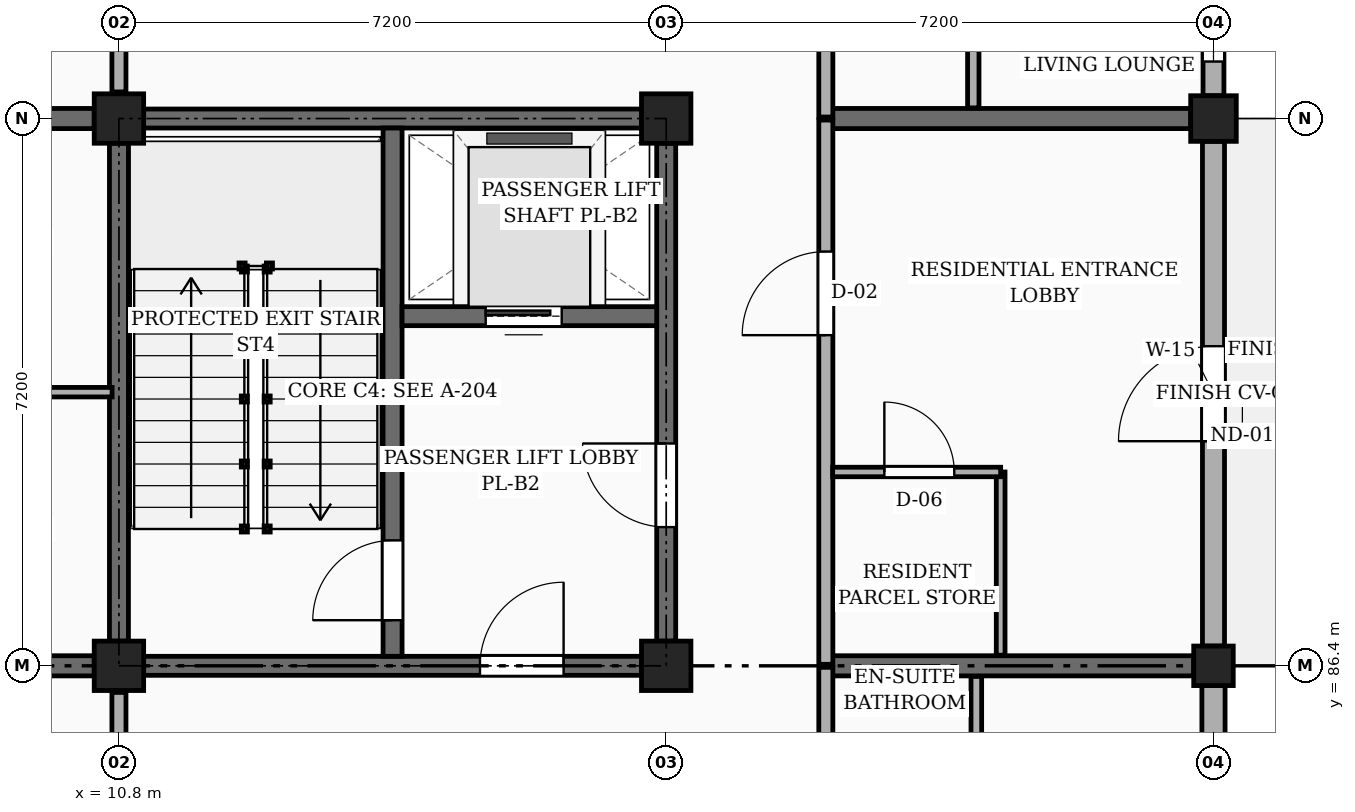
"""IFC4 building model, lengths in metres.
Left out: names, types, materials, properties, quantities, classifications, styles, units other than length and angle.
Written with IfcOpenShell. Run it as: python <this file> out.ifc"""

import sys

from ifc_helpers import new_model, si_unit, direction, frame, frame_2d, origin, origin_2d, place, context, subcontext, project, spatial, rectangle, circle, extrude, element, fill, save


model = new_model("IFC4")
c1 = context("Model", 3, precision=1e-05, world=origin(), true_north=direction((0.0, 1.0)))
c2 = subcontext(c1, "Body", "Model", "MODEL_VIEW")
j1 = project(units=[si_unit("LENGTHUNIT", "METRE"), si_unit("PLANEANGLEUNIT", "RADIAN")], contexts=[c1])
p1 = place(None, origin())
s1 = spatial("IfcSite", under=j1, at=p1, CompositionType="ELEMENT")
p2 = place(p1, origin())
s2 = spatial("IfcBuilding", under=s1, at=p2, CompositionType="ELEMENT")
p3 = place(p2, origin())
s3 = spatial("IfcBuildingStorey", under=s2, at=p3, CompositionType="ELEMENT", Elevation=0.0)
for number, where, z_axis, x_axis in (
    (1, (10.8, 86.4, 0.0), (0.0, 0.0, 1.0), (1.0, 0.0, 0.0)),
    (2, (10.8, 93.6, 0.0), (0.0, 0.0, 1.0), (1.0, 0.0, 0.0)),
    (3, (18.0, 86.4, 0.0), (0.0, 0.0, 1.0), (1.0, 0.0, 0.0)),
    (4, (18.0, 93.6, 0.0), (0.0, 0.0, 1.0), (1.0, 0.0, 0.0)),
):
    element("IfcColumn", number, at=place(p3, frame(where, z_axis=z_axis, x_axis=x_axis)), inside=s3, PredefinedType="COLUMN", context=c2, shape_type="SweptSolid", body=[
        extrude(rectangle(XDim=0.65, YDim=0.65, at=origin_2d()), origin(), (0.0, 0.0, 1.0), 4.5),
    ])
p4 = place(p3, frame((25.2, 86.4, 0.0), z_axis=(0.0, 0.0, 1.0), x_axis=(1.0, 0.0, 0.0)))
e5 = element("IfcColumn", 5, at=p4, inside=s3, PredefinedType="COLUMN", context=c2, shape_type="SweptSolid", body=[
    extrude(circle(Radius=0.26, at=origin_2d()), origin(), (0.0, 0.0, 1.0), 4.5),
])
p5 = place(p3, frame((25.2, 93.6, 0.0), z_axis=(0.0, 0.0, 1.0), x_axis=(1.0, 0.0, 0.0)))
e6 = element("IfcColumn", 6, at=p5, inside=s3, PredefinedType="COLUMN", context=c2, shape_type="SweptSolid", body=[
    extrude(rectangle(XDim=0.6, YDim=0.6, at=origin_2d()), origin(), (0.0, 0.0, 1.0), 4.5),
])
p6 = place(p3, frame((3.9, 86.4, 0.0), z_axis=(0.0, 0.0, 1.0), x_axis=(1.0, 0.0, 0.0)))
e7 = element("IfcWall", 7, at=p6, inside=s3, PredefinedType="SOLIDWALL", context=c2, shape_type="SweptSolid", body=[
    extrude(rectangle(XDim=6.575, YDim=0.265, at=frame_2d((3.288, 0.0))), origin(), (0.0, 0.0, 1.0), 3.56),
])
p7 = place(p6, frame((1.35, 0.0, 0.0)))
e8 = element("IfcOpeningElement", 8, at=p7, cuts=e7, PredefinedType="OPENING", context=c2, shape_type="SweptSolid", body=[
    extrude(rectangle(XDim=0.98, YDim=2.12, at=frame_2d((0.49, 1.06))), frame((0.0, 0.143, 0.0), z_axis=(0.0, -1.0, 0.0), x_axis=(1.0, 0.0, 0.0)), (0.0, 0.0, 1.0), 0.285),
])
p8 = place(p3, frame((20.1, 86.4, 0.0), z_axis=(0.0, 0.0, 1.0), x_axis=(1.0, 0.0, 0.0)))
e9 = element("IfcWall", 9, at=p8, inside=s3, PredefinedType="SOLIDWALL", context=c2, shape_type="SweptSolid", body=[
    extrude(rectangle(XDim=4.84, YDim=0.265, at=frame_2d((2.42, 0.0))), origin(), (0.0, 0.0, 1.0), 3.56),
])
p9 = place(p3, frame((3.9, 93.6, 0.0), z_axis=(0.0, 0.0, 1.0), x_axis=(1.0, 0.0, 0.0)))
e10 = element("IfcWall", 10, at=p9, inside=s3, PredefinedType="SOLIDWALL", context=c2, shape_type="SweptSolid", body=[
    extrude(rectangle(XDim=6.575, YDim=0.265, at=frame_2d((3.288, 0.0))), origin(), (0.0, 0.0, 1.0), 3.56),
])
p10 = place(p3, frame((20.1, 93.6, 0.0), z_axis=(0.0, 0.0, 1.0), x_axis=(1.0, 0.0, 0.0)))
e11 = element("IfcWall", 11, at=p10, inside=s3, PredefinedType="SOLIDWALL", context=c2, shape_type="SweptSolid", body=[
    extrude(rectangle(XDim=4.8, YDim=0.265, at=frame_2d((2.4, 0.0))), origin(), (0.0, 0.0, 1.0), 3.56),
])
p11 = place(p3, frame((25.2, 79.5, 0.0), z_axis=(0.0, 0.0, 1.0), x_axis=(0.0, 1.0, 0.0)))
e12 = element("IfcWall", 12, at=p11, inside=s3, PredefinedType="SOLIDWALL", context=c2, shape_type="SweptSolid", body=[
    extrude(rectangle(XDim=6.64, YDim=0.305, at=frame_2d((3.32, 0.0))), origin(), (0.0, 0.0, 1.0), 3.83),
])
p12 = place(p11, frame((0.45, 0.0, 0.78)))
e13 = element("IfcOpeningElement", 13, at=p12, cuts=e12, PredefinedType="OPENING", context=c2, shape_type="SweptSolid", body=[
    extrude(rectangle(XDim=0.96, YDim=1.26, at=frame_2d((0.48, 0.63))), frame((0.0, 0.163, 0.0), z_axis=(0.0, -1.0, 0.0), x_axis=(1.0, 0.0, 0.0)), (0.0, 0.0, 1.0), 0.325),
])
p13 = place(p11, frame((4.65, 0.0, 0.78)))
e14 = element("IfcOpeningElement", 14, at=p13, cuts=e12, PredefinedType="OPENING", context=c2, shape_type="SweptSolid", body=[
    extrude(rectangle(XDim=1.12, YDim=1.26, at=frame_2d((0.56, 0.63))), frame((0.0, 0.163, 0.0), z_axis=(0.0, -1.0, 0.0), x_axis=(1.0, 0.0, 0.0)), (0.0, 0.0, 1.0), 0.325),
])
p14 = place(p3, frame((25.2, 86.66, 0.0), z_axis=(0.0, 0.0, 1.0), x_axis=(0.0, 1.0, 0.0)))
e15 = element("IfcWall", 15, at=p14, inside=s3, PredefinedType="SOLIDWALL", context=c2, shape_type="SweptSolid", body=[
    extrude(rectangle(XDim=6.64, YDim=0.29, at=frame_2d((3.32, 0.0))), origin(), (0.0, 0.0, 1.0), 3.83),
])
p15 = place(p14, frame((2.695, 0.0, 0.0)))
e16 = element("IfcOpeningElement", 16, at=p15, cuts=e15, PredefinedType="OPENING", context=c2, shape_type="SweptSolid", body=[
    extrude(rectangle(XDim=1.25, YDim=2.15, at=frame_2d((0.625, 1.075))), frame((0.0, 0.155, 0.0), z_axis=(0.0, -1.0, 0.0), x_axis=(1.0, 0.0, 0.0)), (0.0, 0.0, 1.0), 0.31),
])
p16 = place(p3, frame((25.2, 93.9, 0.0), z_axis=(0.0, 0.0, 1.0), x_axis=(0.0, 1.0, 0.0)))
e17 = element("IfcWall", 17, at=p16, inside=s3, PredefinedType="SOLIDWALL", context=c2, shape_type="SweptSolid", body=[
    extrude(rectangle(XDim=6.6, YDim=0.275, at=frame_2d((3.3, 0.0))), origin(), (0.0, 0.0, 1.0), 3.83),
])
p17 = place(p16, frame((0.45, 0.0, 0.78)))
e18 = element("IfcOpeningElement", 18, at=p17, cuts=e17, PredefinedType="OPENING", context=c2, shape_type="SweptSolid", body=[
    extrude(rectangle(XDim=1.12, YDim=1.26, at=frame_2d((0.56, 0.63))), frame((0.0, 0.147, 0.0), z_axis=(0.0, -1.0, 0.0), x_axis=(1.0, 0.0, 0.0)), (0.0, 0.0, 1.0), 0.295),
])
p18 = place(p16, frame((4.65, 0.0, 0.78)))
e19 = element("IfcOpeningElement", 19, at=p18, cuts=e17, PredefinedType="OPENING", context=c2, shape_type="SweptSolid", body=[
    extrude(rectangle(XDim=1.28, YDim=1.26, at=frame_2d((0.64, 0.63))), frame((0.0, 0.147, 0.0), z_axis=(0.0, -1.0, 0.0), x_axis=(1.0, 0.0, 0.0)), (0.0, 0.0, 1.0), 0.295),
])
p19 = place(p3, frame((10.8, 86.725, 0.0), z_axis=(0.0, 0.0, 1.0), x_axis=(0.0, 1.0, 0.0)))
e20 = element("IfcWall", 20, at=p19, inside=s3, PredefinedType="SHEAR", context=c2, shape_type="SweptSolid", body=[
    extrude(rectangle(XDim=6.55, YDim=0.25, at=frame_2d((3.275, 0.0))), origin(), (0.0, 0.0, 1.0), 4.26),
])
p20 = place(p3, frame((11.125, 93.6, 0.0), z_axis=(0.0, 0.0, 1.0), x_axis=(1.0, 0.0, 0.0)))
e21 = element("IfcWall", 21, at=p20, inside=s3, PredefinedType="SHEAR", context=c2, shape_type="SweptSolid", body=[
    extrude(rectangle(XDim=6.55, YDim=0.25, at=frame_2d((3.275, 0.0))), origin(), (0.0, 0.0, 1.0), 4.26),
])
p21 = place(p3, frame((18.0, 86.725, 0.0), z_axis=(0.0, 0.0, 1.0), x_axis=(0.0, 1.0, 0.0)))
e22 = element("IfcWall", 22, at=p21, inside=s3, PredefinedType="SHEAR", context=c2, shape_type="SweptSolid", body=[
    extrude(rectangle(XDim=6.55, YDim=0.25, at=frame_2d((3.275, 0.0))), origin(), (0.0, 0.0, 1.0), 4.26),
])
p22 = place(p21, frame((1.5, 0.0, 0.0)))
e23 = element("IfcOpeningElement", 23, at=p22, cuts=e22, PredefinedType="OPENING", context=c2, shape_type="SweptSolid", body=[
    extrude(rectangle(XDim=1.1, YDim=2.15, at=frame_2d((0.55, 1.075))), frame((0.0, 0.135, 0.0), z_axis=(0.0, -1.0, 0.0), x_axis=(1.0, 0.0, 0.0)), (0.0, 0.0, 1.0), 0.27),
])
p23 = place(p3, frame((11.125, 86.4, 0.0), z_axis=(0.0, 0.0, 1.0), x_axis=(1.0, 0.0, 0.0)))
e24 = element("IfcWall", 24, at=p23, inside=s3, PredefinedType="SHEAR", context=c2, shape_type="SweptSolid", body=[
    extrude(rectangle(XDim=6.55, YDim=0.25, at=frame_2d((3.275, 0.0))), origin(), (0.0, 0.0, 1.0), 4.26),
])
p24 = place(p23, frame((4.425, 0.0, 0.0)))
e25 = element("IfcOpeningElement", 25, at=p24, cuts=e24, PredefinedType="OPENING", context=c2, shape_type="SweptSolid", body=[
    extrude(rectangle(XDim=1.1, YDim=2.15, at=frame_2d((0.55, 1.075))), frame((0.0, 0.135, 0.0), z_axis=(0.0, -1.0, 0.0), x_axis=(1.0, 0.0, 0.0)), (0.0, 0.0, 1.0), 0.27),
])
p25 = place(p3, frame((14.4, 86.525, 0.0), z_axis=(0.0, 0.0, 1.0), x_axis=(0.0, 1.0, 0.0)))
e26 = element("IfcWall", 26, at=p25, inside=s3, PredefinedType="SHEAR", context=c2, shape_type="SweptSolid", body=[
    extrude(rectangle(XDim=6.95, YDim=0.25, at=frame_2d((3.475, 0.0))), origin(), (0.0, 0.0, 1.0), 4.26),
])
p26 = place(p25, frame((0.475, 0.0, 0.0)))
e27 = element("IfcOpeningElement", 27, at=p26, cuts=e26, PredefinedType="OPENING", context=c2, shape_type="SweptSolid", body=[
    extrude(rectangle(XDim=1.05, YDim=2.15, at=frame_2d((0.525, 1.075))), frame((0.0, 0.135, 0.0), z_axis=(0.0, -1.0, 0.0), x_axis=(1.0, 0.0, 0.0)), (0.0, 0.0, 1.0), 0.27),
])
p27 = place(p3, frame((14.525, 91.0, 0.0), z_axis=(0.0, 0.0, 1.0), x_axis=(1.0, 0.0, 0.0)))
e28 = element("IfcWall", 28, at=p27, inside=s3, PredefinedType="SHEAR", context=c2, shape_type="SweptSolid", body=[
    extrude(rectangle(XDim=3.35, YDim=0.25, at=frame_2d((1.675, 0.0))), origin(), (0.0, 0.0, 1.0), 4.26),
])
p28 = place(p27, frame((1.1, 0.0, 0.0)))
e29 = element("IfcOpeningElement", 29, at=p28, cuts=e28, PredefinedType="OPENING", context=c2, shape_type="SweptSolid", body=[
    extrude(rectangle(XDim=1.0, YDim=2.2, at=frame_2d((0.5, 1.1))), frame((0.0, 0.135, 0.0), z_axis=(0.0, -1.0, 0.0), x_axis=(1.0, 0.0, 0.0)), (0.0, 0.0, 1.0), 0.27),
])
p29 = place(p3, frame((20.1, 79.22, 0.0), z_axis=(0.0, 0.0, 1.0), x_axis=(0.0, 1.0, 0.0)))
e30 = element("IfcWall", 30, at=p29, inside=s3, PredefinedType="PARTITIONING", context=c2, shape_type="SweptSolid", body=[
    extrude(rectangle(XDim=7.16, YDim=0.185, at=frame_2d((3.58, 0.0))), origin(), (0.0, 0.0, 1.0), 3.695),
])
p30 = place(p29, frame((1.33, 0.0, 0.0)))
e31 = element("IfcOpeningElement", 31, at=p30, cuts=e30, PredefinedType="OPENING", context=c2, shape_type="SweptSolid", body=[
    extrude(rectangle(XDim=1.14, YDim=2.18, at=frame_2d((0.57, 1.09))), frame((0.0, 0.103, 0.0), z_axis=(0.0, -1.0, 0.0), x_axis=(1.0, 0.0, 0.0)), (0.0, 0.0, 1.0), 0.205),
])
p31 = place(p3, frame((20.1, 86.42, 0.0), z_axis=(0.0, 0.0, 1.0), x_axis=(0.0, 1.0, 0.0)))
e32 = element("IfcWall", 32, at=p31, inside=s3, PredefinedType="PARTITIONING", context=c2, shape_type="SweptSolid", body=[
    extrude(rectangle(XDim=7.16, YDim=0.185, at=frame_2d((3.58, 0.0))), origin(), (0.0, 0.0, 1.0), 3.695),
])
p32 = place(p31, frame((4.33, 0.0, 0.0)))
e33 = element("IfcOpeningElement", 33, at=p32, cuts=e32, PredefinedType="OPENING", context=c2, shape_type="SweptSolid", body=[
    extrude(rectangle(XDim=1.1, YDim=2.15, at=frame_2d((0.55, 1.075))), frame((0.0, 0.103, 0.0), z_axis=(0.0, -1.0, 0.0), x_axis=(1.0, 0.0, 0.0)), (0.0, 0.0, 1.0), 0.205),
])
p33 = place(p3, frame((20.1, 93.62, 0.0), z_axis=(0.0, 0.0, 1.0), x_axis=(0.0, 1.0, 0.0)))
e34 = element("IfcWall", 34, at=p33, inside=s3, PredefinedType="PARTITIONING", context=c2, shape_type="SweptSolid", body=[
    extrude(rectangle(XDim=7.005, YDim=0.185, at=frame_2d((3.502, 0.0))), origin(), (0.0, 0.0, 1.0), 3.695),
])
p34 = place(p33, frame((1.33, 0.0, 0.0)))
e35 = element("IfcOpeningElement", 35, at=p34, cuts=e34, PredefinedType="OPENING", context=c2, shape_type="SweptSolid", body=[
    extrude(rectangle(XDim=0.94, YDim=2.12, at=frame_2d((0.47, 1.06))), frame((0.0, 0.103, 0.0), z_axis=(0.0, -1.0, 0.0), x_axis=(1.0, 0.0, 0.0)), (0.0, 0.0, 1.0), 0.205),
])
p35 = place(p3, frame((10.8, 79.55, 0.0), z_axis=(0.0, 0.0, 1.0), x_axis=(0.0, 1.0, 0.0)))
e36 = element("IfcWall", 36, at=p35, inside=s3, PredefinedType="PARTITIONING", context=c2, shape_type="SweptSolid", body=[
    extrude(rectangle(XDim=6.5, YDim=0.185, at=frame_2d((3.25, 0.0))), origin(), (0.0, 0.0, 1.0), 3.51),
])
p36 = place(p35, frame((1.1, 0.0, 0.0)))
e37 = element("IfcOpeningElement", 37, at=p36, cuts=e36, PredefinedType="OPENING", context=c2, shape_type="SweptSolid", body=[
    extrude(rectangle(XDim=1.0, YDim=2.15, at=frame_2d((0.5, 1.075))), frame((0.0, 0.103, 0.0), z_axis=(0.0, -1.0, 0.0), x_axis=(1.0, 0.0, 0.0)), (0.0, 0.0, 1.0), 0.205),
])
p37 = place(p3, frame((10.8, 93.95, 0.0), z_axis=(0.0, 0.0, 1.0), x_axis=(0.0, 1.0, 0.0)))
e38 = element("IfcWall", 38, at=p37, inside=s3, PredefinedType="PARTITIONING", context=c2, shape_type="SweptSolid", body=[
    extrude(rectangle(XDim=6.5, YDim=0.185, at=frame_2d((3.25, 0.0))), origin(), (0.0, 0.0, 1.0), 3.51),
])
p38 = place(p37, frame((1.0, 0.0, 0.0)))
e39 = element("IfcOpeningElement", 39, at=p38, cuts=e38, PredefinedType="OPENING", context=c2, shape_type="SweptSolid", body=[
    extrude(rectangle(XDim=0.94, YDim=2.12, at=frame_2d((0.47, 1.06))), frame((0.0, 0.103, 0.0), z_axis=(0.0, -1.0, 0.0), x_axis=(1.0, 0.0, 0.0)), (0.0, 0.0, 1.0), 0.205),
])
p39 = place(p3, frame((22.08, 79.34, 0.0), z_axis=(0.0, 0.0, 1.0), x_axis=(0.0, 1.0, 0.0)))
e40 = element("IfcWall", 40, at=p39, inside=s3, PredefinedType="PARTITIONING", context=c2, shape_type="SweptSolid", body=[
    extrude(rectangle(XDim=6.92, YDim=0.14, at=frame_2d((3.46, 0.0))), origin(), (0.0, 0.0, 1.0), 3.695),
])
p40 = place(p39, frame((1.31, 0.0, 0.0)))
e41 = element("IfcOpeningElement", 41, at=p40, cuts=e40, PredefinedType="OPENING", context=c2, shape_type="SweptSolid", body=[
    extrude(rectangle(XDim=0.95, YDim=2.1, at=frame_2d((0.475, 1.05))), frame((0.0, 0.08, 0.0), z_axis=(0.0, -1.0, 0.0), x_axis=(1.0, 0.0, 0.0)), (0.0, 0.0, 1.0), 0.16),
])
p41 = place(p3, frame((3.775, 90.0, 0.0), z_axis=(0.0, 0.0, 1.0), x_axis=(1.0, 0.0, 0.0)))
e42 = element("IfcWall", 42, at=p41, inside=s3, PredefinedType="PARTITIONING", context=c2, shape_type="SweptSolid", body=[
    extrude(rectangle(XDim=6.935, YDim=0.125, at=frame_2d((3.468, 0.0))), origin(), (0.0, 0.0, 1.0), 3.695),
])
p42 = place(p41, frame((2.6, 0.0, 0.0)))
e43 = element("IfcOpeningElement", 43, at=p42, cuts=e42, PredefinedType="OPENING", context=c2, shape_type="SweptSolid", body=[
    extrude(rectangle(XDim=0.92, YDim=2.1, at=frame_2d((0.46, 1.05))), frame((0.0, 0.073, 0.0), z_axis=(0.0, -1.0, 0.0), x_axis=(1.0, 0.0, 0.0)), (0.0, 0.0, 1.0), 0.145),
])
p43 = place(p3, frame((22.4, 86.54, 0.0), z_axis=(0.0, 0.0, 1.0), x_axis=(0.0, 1.0, 0.0)))
e44 = element("IfcWall", 44, at=p43, inside=s3, PredefinedType="PARTITIONING", context=c2, shape_type="SweptSolid", body=[
    extrude(rectangle(XDim=2.41, YDim=0.115, at=frame_2d((1.205, 0.0))), origin(), (0.0, 0.0, 1.0), 3.695),
])
p44 = place(p3, frame((20.19, 88.95, 0.0), z_axis=(0.0, 0.0, 1.0), x_axis=(1.0, 0.0, 0.0)))
e45 = element("IfcWall", 45, at=p44, inside=s3, PredefinedType="PARTITIONING", context=c2, shape_type="SweptSolid", body=[
    extrude(rectangle(XDim=2.21, YDim=0.125, at=frame_2d((1.105, 0.0))), origin(), (0.0, 0.0, 1.0), 3.695),
])
p45 = place(p44, frame((0.68, 0.0, 0.0)))
e46 = element("IfcOpeningElement", 46, at=p45, cuts=e45, PredefinedType="OPENING", context=c2, shape_type="SweptSolid", body=[
    extrude(rectangle(XDim=0.92, YDim=2.1, at=frame_2d((0.46, 1.05))), frame((0.0, 0.073, 0.0), z_axis=(0.0, -1.0, 0.0), x_axis=(1.0, 0.0, 0.0)), (0.0, 0.0, 1.0), 0.145),
])
p46 = place(p3, frame((22.04, 93.74, 0.0), z_axis=(0.0, 0.0, 1.0), x_axis=(0.0, 1.0, 0.0)))
e47 = element("IfcWall", 47, at=p46, inside=s3, PredefinedType="PARTITIONING", context=c2, shape_type="SweptSolid", body=[
    extrude(rectangle(XDim=6.885, YDim=0.15, at=frame_2d((3.442, 0.0))), origin(), (0.0, 0.0, 1.0), 3.695),
])
p47 = place(p46, frame((1.31, 0.0, 0.0)))
e48 = element("IfcOpeningElement", 48, at=p47, cuts=e47, PredefinedType="OPENING", context=c2, shape_type="SweptSolid", body=[
    extrude(rectangle(XDim=0.92, YDim=2.1, at=frame_2d((0.46, 1.05))), frame((0.0, 0.085, 0.0), z_axis=(0.0, -1.0, 0.0), x_axis=(1.0, 0.0, 0.0)), (0.0, 0.0, 1.0), 0.17),
])
p48 = place(p15, frame((1.25, 0.0, 0.0), z_axis=(0.0, 0.0, 1.0), x_axis=(-1.0, 0.0, 0.0)))
e49 = element("IfcDoor", 49, at=p48, inside=s3, OperationType="SINGLE_SWING_LEFT", PredefinedType="DOOR", context=c2, shape_type="SweptSolid", body=[
    extrude(rectangle(XDim=1.25, YDim=2.15, at=frame_2d((0.625, 1.075))), frame((0.0, 0.025, 0.0), z_axis=(0.0, -1.0, 0.0), x_axis=(1.0, 0.0, 0.0)), (0.0, 0.0, 1.0), 0.05),
])
fill(e16, e49)
p49 = place(p17, origin())
e50 = element("IfcWindow", 50, at=p49, inside=s3, PartitioningType="SINGLE_PANEL", PredefinedType="WINDOW", context=c2, shape_type="SweptSolid", body=[
    extrude(rectangle(XDim=1.12, YDim=1.26, at=frame_2d((0.56, 0.63))), frame((0.0, 0.03, 0.0), z_axis=(0.0, -1.0, 0.0), x_axis=(1.0, 0.0, 0.0)), (0.0, 0.0, 1.0), 0.06),
])
fill(e18, e50)
p50 = place(p22, frame((1.1, 0.0, 0.0), z_axis=(0.0, 0.0, 1.0), x_axis=(-1.0, 0.0, 0.0)))
e51 = element("IfcDoor", 51, at=p50, inside=s3, OperationType="SINGLE_SWING_RIGHT", PredefinedType="DOOR", context=c2, shape_type="SweptSolid", body=[
    extrude(rectangle(XDim=1.1, YDim=2.15, at=frame_2d((0.55, 1.075))), frame((0.0, 0.025, 0.0), z_axis=(0.0, -1.0, 0.0), x_axis=(1.0, 0.0, 0.0)), (0.0, 0.0, 1.0), 0.05),
])
fill(e23, e51)
p51 = place(p24, frame((1.1, 0.0, 0.0), z_axis=(0.0, 0.0, 1.0), x_axis=(-1.0, 0.0, 0.0)))
e52 = element("IfcDoor", 52, at=p51, inside=s3, OperationType="SINGLE_SWING_RIGHT", PredefinedType="DOOR", context=c2, shape_type="SweptSolid", body=[
    extrude(rectangle(XDim=1.1, YDim=2.15, at=frame_2d((0.55, 1.075))), frame((0.0, 0.025, 0.0), z_axis=(0.0, -1.0, 0.0), x_axis=(1.0, 0.0, 0.0)), (0.0, 0.0, 1.0), 0.05),
])
fill(e25, e52)
p52 = place(p26, frame((1.05, 0.0, 0.0), z_axis=(0.0, 0.0, 1.0), x_axis=(-1.0, 0.0, 0.0)))
e53 = element("IfcDoor", 53, at=p52, inside=s3, OperationType="SINGLE_SWING_LEFT", PredefinedType="DOOR", context=c2, shape_type="SweptSolid", body=[
    extrude(rectangle(XDim=1.05, YDim=2.15, at=frame_2d((0.525, 1.075))), frame((0.0, 0.025, 0.0), z_axis=(0.0, -1.0, 0.0), x_axis=(1.0, 0.0, 0.0)), (0.0, 0.0, 1.0), 0.05),
])
fill(e27, e53)
p53 = place(p28, origin())
e54 = element("IfcDoor", 54, at=p53, inside=s3, OperationType="SLIDING_TO_LEFT", PredefinedType="DOOR", context=c2, shape_type="SweptSolid", body=[
    extrude(rectangle(XDim=1.0, YDim=2.2, at=frame_2d((0.5, 1.1))), frame((0.0, 0.025, 0.0), z_axis=(0.0, -1.0, 0.0), x_axis=(1.0, 0.0, 0.0)), (0.0, 0.0, 1.0), 0.05),
])
fill(e29, e54)
p54 = place(p32, origin())
e55 = element("IfcDoor", 55, at=p54, inside=s3, OperationType="SINGLE_SWING_LEFT", PredefinedType="DOOR", context=c2, shape_type="SweptSolid", body=[
    extrude(rectangle(XDim=1.1, YDim=2.15, at=frame_2d((0.55, 1.075))), frame((0.0, 0.025, 0.0), z_axis=(0.0, -1.0, 0.0), x_axis=(1.0, 0.0, 0.0)), (0.0, 0.0, 1.0), 0.05),
])
fill(e33, e55)
p55 = place(p45, origin())
e56 = element("IfcDoor", 56, at=p55, inside=s3, OperationType="SINGLE_SWING_LEFT", PredefinedType="DOOR", context=c2, shape_type="SweptSolid", body=[
    extrude(rectangle(XDim=0.92, YDim=2.1, at=frame_2d((0.46, 1.05))), frame((0.0, 0.025, 0.0), z_axis=(0.0, -1.0, 0.0), x_axis=(1.0, 0.0, 0.0)), (0.0, 0.0, 1.0), 0.05),
])
fill(e46, e56)
save(model, sys.argv[1])
